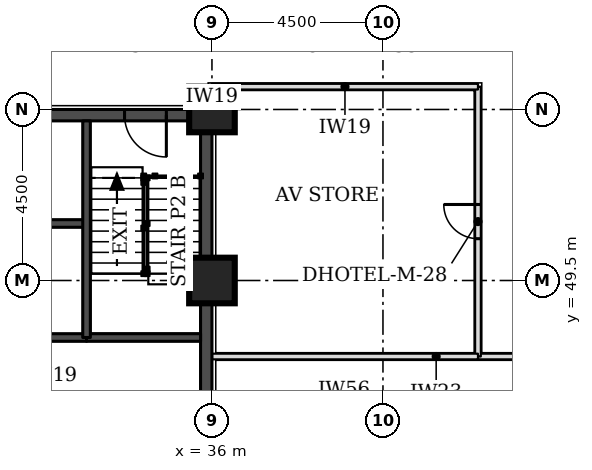
"""IFC4 building model, lengths in metres.
Left out: names, types, materials, properties, quantities, classifications, styles, units other than length and angle.
Written with IfcOpenShell. Run it as: python <this file> out.ifc"""

import sys

from ifc_helpers import new_model, si_unit, direction, frame, frame_2d, origin, origin_2d, place, context, subcontext, project, spatial, rectangle, extrude, element, fill, save


model = new_model("IFC4")
c1 = context("Model", 3, precision=1e-05, world=origin(), true_north=direction((0.0, 1.0)))
c2 = subcontext(c1, "Body", "Model", "MODEL_VIEW")
j1 = project(units=[si_unit("LENGTHUNIT", "METRE"), si_unit("PLANEANGLEUNIT", "RADIAN")], contexts=[c1])
p1 = place(None, origin())
s1 = spatial("IfcSite", under=j1, at=p1, CompositionType="ELEMENT")
p2 = place(p1, origin())
s2 = spatial("IfcBuilding", under=s1, at=p2, CompositionType="ELEMENT")
p3 = place(p2, frame((0.0, 0.0, 23.1)))
s3 = spatial("IfcBuildingStorey", under=s2, at=p3, CompositionType="ELEMENT", Elevation=23.1)
for number, where, z_axis, x_axis in (
    (1, (36.0, 49.5, 0.0), (0.0, 0.0, 1.0), (1.0, 0.0, 0.0)),
    (2, (36.0, 54.0, 0.0), (0.0, 0.0, 1.0), (1.0, 0.0, 0.0)),
):
    element("IfcColumn", number, at=place(p3, frame(where, z_axis=z_axis, x_axis=x_axis)), inside=s3, PredefinedType="COLUMN", context=c2, shape_type="SweptSolid", body=[
        extrude(rectangle(XDim=1.2, YDim=1.2, at=origin_2d()), origin(), (0.0, 0.0, 1.0), 3.3),
    ])
p4 = place(p3, frame((27.3, 53.85, 0.0), z_axis=(0.0, 0.0, 1.0), x_axis=(1.0, 0.0, 0.0)))
e3 = element("IfcWall", 3, at=p4, inside=s3, PredefinedType="SHEAR", context=c2, shape_type="SweptSolid", body=[
    extrude(rectangle(XDim=8.4, YDim=0.3, at=frame_2d((4.2, 0.0))), origin(), (0.0, 0.0, 1.0), 3.3),
])
p5 = place(p4, frame((6.4, 0.0, 0.0)))
e4 = element("IfcOpeningElement", 4, at=p5, cuts=e3, PredefinedType="OPENING", context=c2, shape_type="SweptSolid", body=[
    extrude(rectangle(XDim=1.1, YDim=2.1, at=frame_2d((0.55, 1.05))), frame((0.0, 0.16, 0.0), z_axis=(0.0, -1.0, 0.0), x_axis=(1.0, 0.0, 0.0)), (0.0, 0.0, 1.0), 0.32),
])
p6 = place(p3, frame((35.85, 45.0, 0.0), z_axis=(0.0, 0.0, 1.0), x_axis=(0.0, 1.0, 0.0)))
e5 = element("IfcWall", 5, at=p6, inside=s3, PredefinedType="SHEAR", context=c2, shape_type="SweptSolid", body=[
    extrude(rectangle(XDim=9.0, YDim=0.3, at=frame_2d((4.5, 0.0))), origin(), (0.0, 0.0, 1.0), 3.3),
])
p7 = place(p3, frame((43.0, 47.5, 0.0), z_axis=(0.0, 0.0, 1.0), x_axis=(1.0, 0.0, 0.0)))
e6 = element("IfcWall", 6, at=p7, inside=s3, PredefinedType="PARTITIONING", context=c2, shape_type="SweptSolid", body=[
    extrude(rectangle(XDim=4.0, YDim=0.15, at=frame_2d((2.0, 0.0))), origin(), (0.0, 0.0, 1.0), 3.08),
])
p8 = place(p3, frame((43.0, 47.5, 0.0), z_axis=(0.0, 0.0, 1.0), x_axis=(0.0, 1.0, 0.0)))
e7 = element("IfcWall", 7, at=p8, inside=s3, PredefinedType="PARTITIONING", context=c2, shape_type="SweptSolid", body=[
    extrude(rectangle(XDim=7.1, YDim=0.15, at=frame_2d((3.55, 0.0))), origin(), (0.0, 0.0, 1.0), 3.08),
])
p9 = place(p8, frame((3.1, 0.0, 0.0)))
e8 = element("IfcOpeningElement", 8, at=p9, cuts=e7, PredefinedType="OPENING", context=c2, shape_type="SweptSolid", body=[
    extrude(rectangle(XDim=0.9, YDim=2.1, at=frame_2d((0.45, 1.05))), frame((0.0, 0.085, 0.0), z_axis=(0.0, -1.0, 0.0), x_axis=(1.0, 0.0, 0.0)), (0.0, 0.0, 1.0), 0.17),
])
p10 = place(p3, frame((36.0, 54.05, 0.0), z_axis=(0.0, 0.0, 1.0), x_axis=(0.0, 1.0, 0.0)))
e9 = element("IfcWall", 9, at=p10, inside=s3, PredefinedType="PARTITIONING", context=c2, shape_type="SweptSolid", body=[
    extrude(rectangle(XDim=0.55, YDim=0.15, at=frame_2d((0.275, 0.0))), origin(), (0.0, 0.0, 1.0), 3.08),
])
for number, where, z_axis, x_axis in (
    (10, (36.0, 54.6, 0.0), (0.0, 0.0, 1.0), (1.0, 0.0, 0.0)),
    (11, (36.0, 47.5, 0.0), (0.0, 0.0, 1.0), (1.0, 0.0, 0.0)),
):
    element("IfcWall", number, at=place(p3, frame(where, z_axis=z_axis, x_axis=x_axis)), inside=s3, PredefinedType="PARTITIONING", context=c2, shape_type="SweptSolid", body=[
        extrude(rectangle(XDim=7.0, YDim=0.15, at=frame_2d((3.5, 0.0))), origin(), (0.0, 0.0, 1.0), 3.08),
    ])
p11 = place(p3, frame((30.3, 48.0, 0.0), z_axis=(0.0, 0.0, 1.0), x_axis=(1.0, 0.0, 0.0)))
e12 = element("IfcWall", 12, at=p11, inside=s3, PredefinedType="SOLIDWALL", context=c2, shape_type="SweptSolid", body=[
    extrude(rectangle(XDim=2.4, YDim=0.2, at=frame_2d((1.2, 0.0))), origin(), (0.0, 0.0, 1.0), 3.08),
])
p12 = place(p3, frame((32.7, 48.0, 0.0), z_axis=(0.0, 0.0, 1.0), x_axis=(1.0, 0.0, 0.0)))
e13 = element("IfcWall", 13, at=p12, inside=s3, PredefinedType="SOLIDWALL", context=c2, shape_type="SweptSolid", body=[
    extrude(rectangle(XDim=3.0, YDim=0.2, at=frame_2d((1.5, 0.0))), origin(), (0.0, 0.0, 1.0), 3.08),
])
p13 = place(p3, frame((30.3, 51.0, 0.0), z_axis=(0.0, 0.0, 1.0), x_axis=(1.0, 0.0, 0.0)))
e14 = element("IfcWall", 14, at=p13, inside=s3, PredefinedType="SOLIDWALL", context=c2, shape_type="SweptSolid", body=[
    extrude(rectangle(XDim=2.4, YDim=0.2, at=frame_2d((1.2, 0.0))), origin(), (0.0, 0.0, 1.0), 3.3),
])
p14 = place(p3, frame((32.7, 48.0, 0.0), z_axis=(0.0, 0.0, 1.0), x_axis=(0.0, 1.0, 0.0)))
e15 = element("IfcWall", 15, at=p14, inside=s3, PredefinedType="SOLIDWALL", context=c2, shape_type="SweptSolid", body=[
    extrude(rectangle(XDim=5.7, YDim=0.2, at=frame_2d((2.85, 0.0))), origin(), (0.0, 0.0, 1.0), 3.08),
])
p15 = place(p9, origin())
e16 = element("IfcDoor", 16, at=p15, inside=s3, OperationType="SINGLE_SWING_RIGHT", PredefinedType="DOOR", context=c2, shape_type="SweptSolid", body=[
    extrude(rectangle(XDim=0.9, YDim=2.1, at=frame_2d((0.45, 1.05))), frame((0.0, 0.025, 0.0), z_axis=(0.0, -1.0, 0.0), x_axis=(1.0, 0.0, 0.0)), (0.0, 0.0, 1.0), 0.05),
])
fill(e8, e16)
p16 = place(p5, frame((1.1, 0.0, 0.0), z_axis=(0.0, 0.0, 1.0), x_axis=(-1.0, 0.0, 0.0)))
e17 = element("IfcDoor", 17, at=p16, inside=s3, OperationType="SINGLE_SWING_LEFT", PredefinedType="DOOR", context=c2, shape_type="SweptSolid", body=[
    extrude(rectangle(XDim=1.1, YDim=2.1, at=frame_2d((0.55, 1.05))), frame((0.0, 0.025, 0.0), z_axis=(0.0, -1.0, 0.0), x_axis=(1.0, 0.0, 0.0)), (0.0, 0.0, 1.0), 0.05),
])
fill(e4, e17)
save(model, sys.argv[1])
